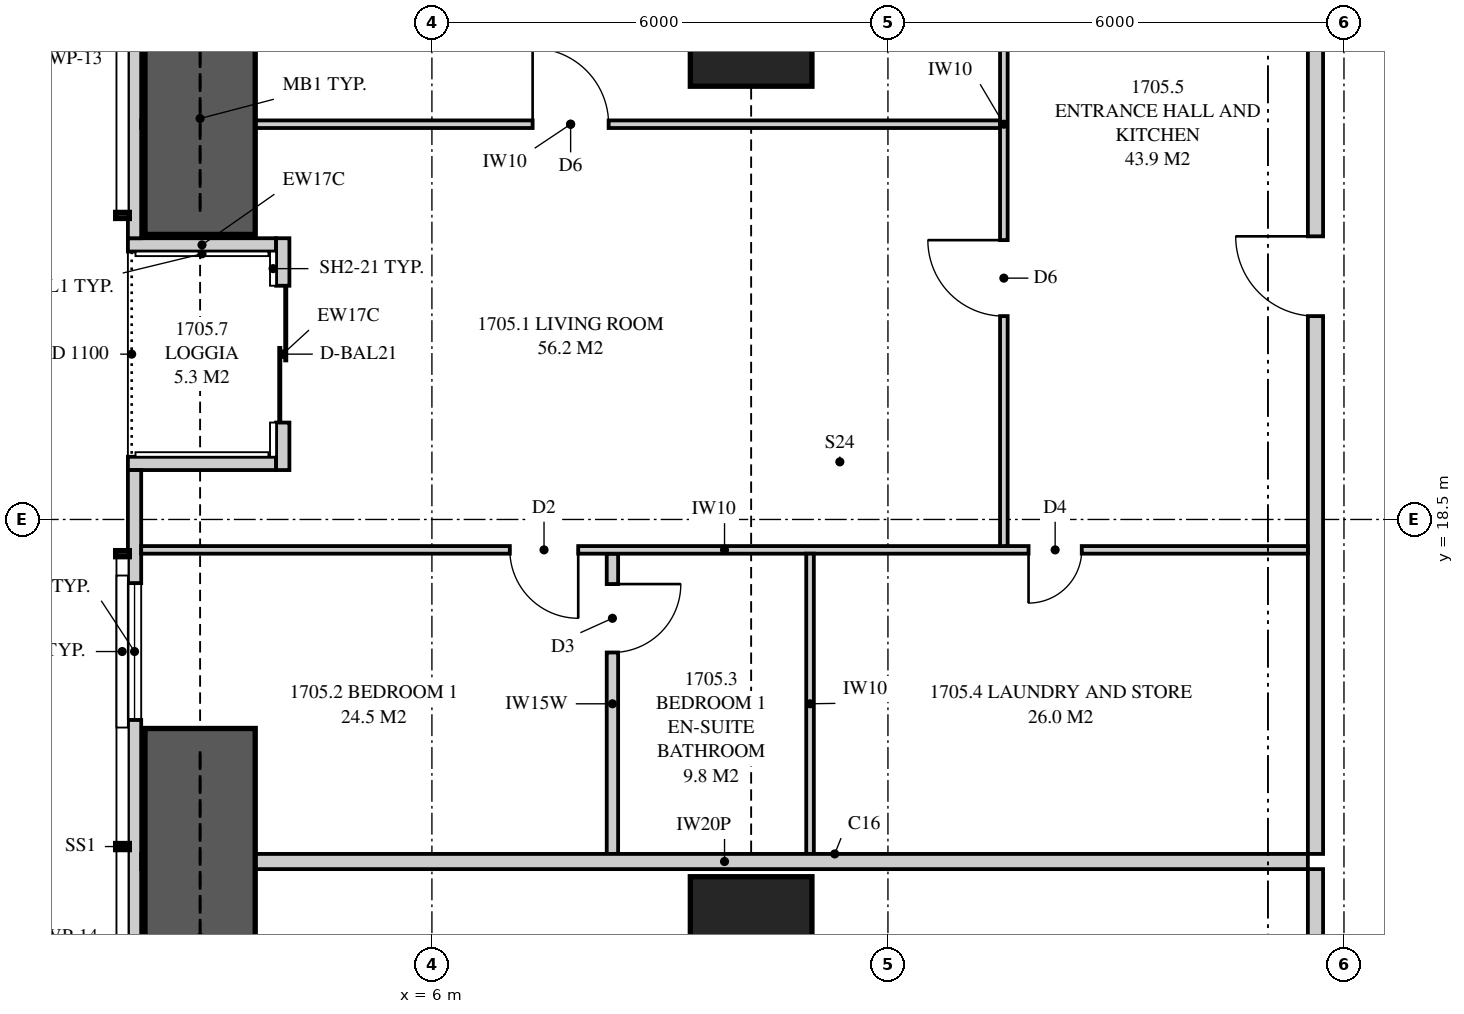
"""IFC4 building model, lengths in metres.
Left out: names, types, materials, properties, quantities, classifications, styles, units other than length and angle.
Written with IfcOpenShell. Run it as: python <this file> out.ifc"""

import sys

from ifc_helpers import new_model, si_unit, direction, frame, frame_2d, origin, origin_2d, place, context, subcontext, project, spatial, polyline, rectangle, outline, extrude, element, fill, save


model = new_model("IFC4")
c1 = context("Model", 3, precision=1e-05, world=origin(), true_north=direction((0.0, 1.0)))
c2 = subcontext(c1, "Body", "Model", "MODEL_VIEW")
j1 = project(units=[si_unit("LENGTHUNIT", "METRE"), si_unit("PLANEANGLEUNIT", "RADIAN")], contexts=[c1])
p1 = place(None, origin())
s1 = spatial("IfcSite", under=j1, at=p1, CompositionType="ELEMENT")
p2 = place(p1, origin())
s2 = spatial("IfcBuilding", under=s1, at=p2, CompositionType="ELEMENT")
p3 = place(p2, frame((0.0, 0.0, 64.55)))
s3 = spatial("IfcBuildingStorey", under=s2, at=p3, CompositionType="ELEMENT", Elevation=64.55)
for number, where, z_axis, x_axis in (
    (1, (10.2, 13.0, 0.0), (0.0, 0.0, 1.0), (1.0, 0.0, 0.0)),
    (2, (10.2, 25.0, 0.0), (0.0, 0.0, 1.0), (1.0, 0.0, 0.0)),
):
    element("IfcColumn", number, at=place(p3, frame(where, z_axis=z_axis, x_axis=x_axis)), inside=s3, PredefinedType="COLUMN", context=c2, shape_type="SweptSolid", body=[
        extrude(rectangle(XDim=1.6, YDim=1.6, at=origin_2d()), origin(), (0.0, 0.0, 1.0), 3.35),
    ])
p4 = place(p3, frame((2.087, 34.949, 0.0), z_axis=(0.0, 0.0, 1.0), x_axis=(0.0, -1.0, 0.0)))
e3 = element("IfcWall", 3, at=p4, inside=s3, PredefinedType="SOLIDWALL", context=c2, shape_type="SweptSolid", body=[
    extrude(outline(polyline([(0.0, 0.0), (12.749, 0.0), (12.749, 2.15), (9.949, 2.15), (9.949, 3.11), (9.823, 3.11), (9.823, 2.15), (9.73, 2.15), (9.73, 3.11), (0.0, 3.11), (0.0, 0.0)])), frame((0.0, 0.087, 0.0), z_axis=(0.0, -1.0, 0.0), x_axis=(1.0, 0.0, 0.0)), (0.0, 0.0, 1.0), 0.175),
])
p5 = place(p4, frame((2.722, 0.0, 0.4)))
e4 = element("IfcOpeningElement", 4, at=p5, cuts=e3, PredefinedType="OPENING", context=c2, shape_type="SweptSolid", body=[
    extrude(rectangle(XDim=1.8, YDim=1.7, at=frame_2d((0.9, 0.85))), frame((0.0, 0.097, 0.0), z_axis=(0.0, -1.0, 0.0), x_axis=(1.0, 0.0, 0.0)), (0.0, 0.0, 1.0), 0.195),
])
p6 = place(p4, frame((5.899, 0.0, 0.4)))
e5 = element("IfcOpeningElement", 5, at=p6, cuts=e3, PredefinedType="OPENING", context=c2, shape_type="SweptSolid", body=[
    extrude(rectangle(XDim=1.2, YDim=1.7, at=frame_2d((0.6, 0.85))), frame((0.0, 0.097, 0.0), z_axis=(0.0, -1.0, 0.0), x_axis=(1.0, 0.0, 0.0)), (0.0, 0.0, 1.0), 0.195),
])
p7 = place(p3, frame((2.087, 19.15, 0.0), z_axis=(0.0, 0.0, 1.0), x_axis=(0.0, -1.0, 0.0)))
e6 = element("IfcWall", 6, at=p7, inside=s3, PredefinedType="SOLIDWALL", context=c2, shape_type="SweptSolid", body=[
    extrude(outline(polyline([(0.0, 0.0), (16.099, 0.0), (16.099, 3.11), (6.369, 3.11), (6.369, 2.15), (6.276, 2.15), (6.276, 3.11), (6.15, 3.11), (6.15, 2.15), (0.0, 2.15), (0.0, 0.0)])), frame((0.0, 0.087, 0.0), z_axis=(0.0, -1.0, 0.0), x_axis=(1.0, 0.0, 0.0)), (0.0, 0.0, 1.0), 0.175),
])
p8 = place(p7, frame((1.488, 0.0, 0.4)))
e7 = element("IfcOpeningElement", 7, at=p8, cuts=e6, PredefinedType="OPENING", context=c2, shape_type="SweptSolid", body=[
    extrude(rectangle(XDim=1.8, YDim=1.7, at=frame_2d((0.9, 0.85))), frame((0.0, 0.097, 0.0), z_axis=(0.0, -1.0, 0.0), x_axis=(1.0, 0.0, 0.0)), (0.0, 0.0, 1.0), 0.195),
])
p9 = place(p7, frame((9.106, 0.0, 0.4)))
e8 = element("IfcOpeningElement", 8, at=p9, cuts=e6, PredefinedType="OPENING", context=c2, shape_type="SweptSolid", body=[
    extrude(rectangle(XDim=1.2, YDim=1.7, at=frame_2d((0.6, 0.85))), frame((0.0, 0.097, 0.0), z_axis=(0.0, -1.0, 0.0), x_axis=(1.0, 0.0, 0.0)), (0.0, 0.0, 1.0), 0.195),
])
p10 = place(p7, frame((12.077, 0.0, 0.4)))
e9 = element("IfcOpeningElement", 9, at=p10, cuts=e6, PredefinedType="OPENING", context=c2, shape_type="SweptSolid", body=[
    extrude(rectangle(XDim=1.8, YDim=1.7, at=frame_2d((0.9, 0.85))), frame((0.0, 0.097, 0.0), z_axis=(0.0, -1.0, 0.0), x_axis=(1.0, 0.0, 0.0)), (0.0, 0.0, 1.0), 0.195),
])
p11 = place(p3, frame((4.038, 22.2, 0.0), z_axis=(0.0, 0.0, 1.0), x_axis=(0.0, -1.0, 0.0)))
e10 = element("IfcWall", 10, at=p11, inside=s3, PredefinedType="SOLIDWALL", context=c2, shape_type="SweptSolid", body=[
    extrude(rectangle(XDim=3.05, YDim=0.175, at=frame_2d((1.525, 0.0))), origin(), (0.0, 0.0, 1.0), 3.11),
])
p12 = place(p11, frame((0.625, 0.0, 0.0)))
e11 = element("IfcOpeningElement", 11, at=p12, cuts=e10, PredefinedType="OPENING", context=c2, shape_type="SweptSolid", body=[
    extrude(rectangle(XDim=1.8, YDim=2.1, at=frame_2d((0.9, 1.05))), frame((0.0, 0.097, 0.0), z_axis=(0.0, -1.0, 0.0), x_axis=(1.0, 0.0, 0.0)), (0.0, 0.0, 1.0), 0.195),
])
for number, where, z_axis, x_axis in (
    (12, (2.0, 22.113, 0.0), (0.0, 0.0, 1.0), (1.0, 0.0, 0.0)),
    (13, (2.0, 19.238, 0.0), (0.0, 0.0, 1.0), (1.0, 0.0, 0.0)),
):
    element("IfcWall", number, at=place(p3, frame(where, z_axis=z_axis, x_axis=x_axis)), inside=s3, PredefinedType="SOLIDWALL", context=c2, shape_type="SweptSolid", body=[
        extrude(outline(polyline([(0.0, 0.0), (1.95, 0.0), (1.95, 3.11), (1.75, 3.11), (1.75, 2.15), (0.15, 2.15), (0.15, 3.11), (0.0, 3.11), (0.0, 0.0)])), frame((0.0, 0.087, 0.0), z_axis=(0.0, -1.0, 0.0), x_axis=(1.0, 0.0, 0.0)), (0.0, 0.0, 1.0), 0.175),
    ])
p13 = place(p3, frame((2.175, 14.0, 0.0), z_axis=(0.0, 0.0, 1.0), x_axis=(1.0, 0.0, 0.0)))
e14 = element("IfcWall", 14, at=p13, inside=s3, PredefinedType="PARTITIONING", context=c2, shape_type="SweptSolid", body=[
    extrude(outline(polyline([(0.529, 2.15), (0.0, 2.15), (0.0, 0.0), (0.529, 0.0), (0.529, 0.82), (1.021, 0.82), (1.021, 0.0), (15.35, 0.0), (15.35, 3.11), (9.335, 3.11), (9.335, 2.51), (6.715, 2.51), (6.715, 3.11), (1.685, 3.11), (1.685, 2.15), (1.021, 2.15), (1.021, 1.33), (0.529, 1.33), (0.529, 2.15)])), frame((0.0, 0.1, 0.0), z_axis=(0.0, -1.0, 0.0), x_axis=(1.0, 0.0, 0.0)), (0.0, 0.0, 1.0), 0.2),
])
p14 = place(p3, frame((17.625, 7.75, 0.0), z_axis=(0.0, 0.0, 1.0), x_axis=(0.0, 1.0, 0.0)))
e15 = element("IfcWall", 15, at=p14, inside=s3, PredefinedType="PARTITIONING", context=c2, shape_type="SweptSolid", body=[
    extrude(outline(polyline([(0.0, 0.0), (6.15, 0.0), (6.15, 3.11), (5.587, 3.11), (5.587, 2.541), (4.913, 2.541), (4.913, 3.11), (0.0, 3.11), (0.0, 0.0)])), frame((0.0, 0.1, 0.0), z_axis=(0.0, -1.0, 0.0), x_axis=(1.0, 0.0, 0.0)), (0.0, 0.0, 1.0), 0.2),
])
p15 = place(p14, frame((2.175, 0.0, 0.0)))
e16 = element("IfcOpeningElement", 16, at=p15, cuts=e15, PredefinedType="OPENING", context=c2, shape_type="SweptSolid", body=[
    extrude(rectangle(XDim=1.8, YDim=2.1, at=frame_2d((0.9, 1.05))), frame((0.0, 0.11, 0.0), z_axis=(0.0, -1.0, 0.0), x_axis=(1.0, 0.0, 0.0)), (0.0, 0.0, 1.0), 0.22),
])
p16 = place(p3, frame((17.625, 14.1, 0.0), z_axis=(0.0, 0.0, 1.0), x_axis=(0.0, 1.0, 0.0)))
e17 = element("IfcWall", 17, at=p16, inside=s3, PredefinedType="PARTITIONING", context=c2, shape_type="SweptSolid", body=[
    extrude(outline(polyline([(0.0, 0.0), (15.15, 0.0), (15.15, 3.11), (11.237, 3.11), (11.237, 2.541), (10.562, 2.541), (10.562, 3.11), (0.0, 3.11), (0.0, 0.0)])), frame((0.0, 0.1, 0.0), z_axis=(0.0, -1.0, 0.0), x_axis=(1.0, 0.0, 0.0)), (0.0, 0.0, 1.0), 0.2),
])
p17 = place(p16, frame((7.075, 0.0, 0.0)))
e18 = element("IfcOpeningElement", 18, at=p17, cuts=e17, PredefinedType="OPENING", context=c2, shape_type="SweptSolid", body=[
    extrude(rectangle(XDim=1.05, YDim=2.2, at=frame_2d((0.525, 1.1))), frame((0.0, 0.11, 0.0), z_axis=(0.0, -1.0, 0.0), x_axis=(1.0, 0.0, 0.0)), (0.0, 0.0, 1.0), 0.22),
])
p18 = place(p3, frame((2.175, 18.1, 0.0), z_axis=(0.0, 0.0, 1.0), x_axis=(1.0, 0.0, 0.0)))
e19 = element("IfcWall", 19, at=p18, inside=s3, PredefinedType="PARTITIONING", context=c2, shape_type="SweptSolid", body=[
    extrude(outline(polyline([(0.0, 0.0), (15.35, 0.0), (15.35, 3.11), (9.285, 3.11), (9.285, 2.51), (6.765, 2.51), (6.765, 3.11), (1.635, 3.11), (1.635, 2.15), (0.0, 2.15), (0.0, 3.11), (0.0, 0.0)])), frame((0.0, 0.05, 0.0), z_axis=(0.0, -1.0, 0.0), x_axis=(1.0, 0.0, 0.0)), (0.0, 0.0, 1.0), 0.1),
])
p19 = place(p18, frame((4.85, 0.0, 0.0)))
e20 = element("IfcOpeningElement", 20, at=p19, cuts=e19, PredefinedType="OPENING", context=c2, shape_type="SweptSolid", body=[
    extrude(rectangle(XDim=0.9, YDim=2.1, at=frame_2d((0.45, 1.05))), frame((0.0, 0.06, 0.0), z_axis=(0.0, -1.0, 0.0), x_axis=(1.0, 0.0, 0.0)), (0.0, 0.0, 1.0), 0.12),
])
p20 = place(p18, frame((11.675, 0.0, 0.0)))
e21 = element("IfcOpeningElement", 21, at=p20, cuts=e19, PredefinedType="OPENING", context=c2, shape_type="SweptSolid", body=[
    extrude(rectangle(XDim=0.7, YDim=2.1, at=frame_2d((0.35, 1.05))), frame((0.0, 0.06, 0.0), z_axis=(0.0, -1.0, 0.0), x_axis=(1.0, 0.0, 0.0)), (0.0, 0.0, 1.0), 0.12),
])
p21 = place(p3, frame((8.375, 14.1, 0.0), z_axis=(0.0, 0.0, 1.0), x_axis=(0.0, 1.0, 0.0)))
e22 = element("IfcWall", 22, at=p21, inside=s3, PredefinedType="PLUMBINGWALL", context=c2, shape_type="SweptSolid", body=[
    extrude(rectangle(XDim=3.95, YDim=0.15, at=frame_2d((1.975, 0.0))), origin(), (0.0, 0.0, 1.0), 3.11),
])
p22 = place(p21, frame((2.65, 0.0, 0.0)))
e23 = element("IfcOpeningElement", 23, at=p22, cuts=e22, PredefinedType="OPENING", context=c2, shape_type="SweptSolid", body=[
    extrude(rectangle(XDim=0.9, YDim=2.1, at=frame_2d((0.45, 1.05))), frame((0.0, 0.085, 0.0), z_axis=(0.0, -1.0, 0.0), x_axis=(1.0, 0.0, 0.0)), (0.0, 0.0, 1.0), 0.17),
])
p23 = place(p3, frame((10.975, 14.1, 0.0), z_axis=(0.0, 0.0, 1.0), x_axis=(0.0, 1.0, 0.0)))
e24 = element("IfcWall", 24, at=p23, inside=s3, PredefinedType="PARTITIONING", context=c2, shape_type="SweptSolid", body=[
    extrude(outline(polyline([(0.0, 0.0), (3.95, 0.0), (3.95, 3.11), (3.95, 2.51), (0.0, 2.51), (0.0, 3.11), (0.0, 0.0)])), frame((0.0, 0.05, 0.0), z_axis=(0.0, -1.0, 0.0), x_axis=(1.0, 0.0, 0.0)), (0.0, 0.0, 1.0), 0.1),
])
p24 = place(p3, frame((13.525, 18.15, 0.0), z_axis=(0.0, 0.0, 1.0), x_axis=(0.0, 1.0, 0.0)))
e25 = element("IfcWall", 25, at=p24, inside=s3, PredefinedType="PARTITIONING", context=c2, shape_type="SweptSolid", body=[
    extrude(outline(polyline([(0.0, 0.0), (11.1, 0.0), (11.1, 3.11), (7.137, 3.11), (7.137, 2.541), (6.563, 2.541), (6.563, 3.11), (0.0, 3.11), (0.0, 0.0)])), frame((0.0, 0.05, 0.0), z_axis=(0.0, -1.0, 0.0), x_axis=(1.0, 0.0, 0.0)), (0.0, 0.0, 1.0), 0.1),
])
p25 = place(p24, frame((3.025, 0.0, 0.0)))
e26 = element("IfcOpeningElement", 26, at=p25, cuts=e25, PredefinedType="OPENING", context=c2, shape_type="SweptSolid", body=[
    extrude(rectangle(XDim=1.0, YDim=2.1, at=frame_2d((0.5, 1.05))), frame((0.0, 0.06, 0.0), z_axis=(0.0, -1.0, 0.0), x_axis=(1.0, 0.0, 0.0)), (0.0, 0.0, 1.0), 0.12),
])
p26 = place(p3, frame((2.175, 23.7, 0.0), z_axis=(0.0, 0.0, 1.0), x_axis=(1.0, 0.0, 0.0)))
e27 = element("IfcWall", 27, at=p26, inside=s3, PredefinedType="PARTITIONING", context=c2, shape_type="SweptSolid", body=[
    extrude(outline(polyline([(0.529, 2.15), (0.0, 2.15), (0.0, 0.0), (0.529, 0.0), (0.529, 0.581), (1.021, 0.581), (1.021, 0.0), (11.3, 0.0), (11.3, 3.11), (9.285, 3.11), (9.285, 2.51), (6.765, 2.51), (6.765, 3.11), (1.635, 3.11), (1.635, 2.15), (1.021, 2.15), (1.021, 1.569), (0.529, 1.569), (0.529, 2.15)])), frame((0.0, 0.05, 0.0), z_axis=(0.0, -1.0, 0.0), x_axis=(1.0, 0.0, 0.0)), (0.0, 0.0, 1.0), 0.1),
])
p27 = place(p26, frame((5.15, 0.0, 0.0)))
e28 = element("IfcOpeningElement", 28, at=p27, cuts=e27, PredefinedType="OPENING", context=c2, shape_type="SweptSolid", body=[
    extrude(rectangle(XDim=1.0, YDim=2.1, at=frame_2d((0.5, 1.05))), frame((0.0, 0.06, 0.0), z_axis=(0.0, -1.0, 0.0), x_axis=(1.0, 0.0, 0.0)), (0.0, 0.0, 1.0), 0.12),
])
for number, where, z_axis, x_axis in (
    (29, (2.95, 22.25, 0.0), (0.0, 0.0, 1.0), (0.0, 1.0, 0.0)),
    (30, (2.95, 10.25, 0.0), (0.0, 0.0, 1.0), (0.0, 1.0, 0.0)),
):
    element("IfcWall", number, at=place(p3, frame(where, z_axis=z_axis, x_axis=x_axis)), inside=s3, PredefinedType="SHEAR", context=c2, shape_type="SweptSolid", body=[
        extrude(rectangle(XDim=5.5, YDim=1.45, at=frame_2d((2.75, 0.0))), origin(), (0.0, 0.0, 1.0), 3.35),
    ])
p28 = place(p12, origin())
e31 = element("IfcDoor", 31, at=p28, inside=s3, OperationType="SLIDING_TO_LEFT", PredefinedType="DOOR", context=c2, shape_type="SweptSolid", body=[
    extrude(rectangle(XDim=1.8, YDim=2.1, at=frame_2d((0.9, 1.05))), frame((0.0, 0.025, 0.0), z_axis=(0.0, -1.0, 0.0), x_axis=(1.0, 0.0, 0.0)), (0.0, 0.0, 1.0), 0.05),
])
fill(e11, e31)
p29 = place(p8, origin())
e32 = element("IfcWindow", 32, at=p29, inside=s3, PartitioningType="SINGLE_PANEL", PredefinedType="WINDOW", context=c2, shape_type="SweptSolid", body=[
    extrude(rectangle(XDim=1.8, YDim=1.7, at=frame_2d((0.9, 0.85))), frame((0.0, 0.03, 0.0), z_axis=(0.0, -1.0, 0.0), x_axis=(1.0, 0.0, 0.0)), (0.0, 0.0, 1.0), 0.06),
])
fill(e7, e32)
p30 = place(p17, origin())
e33 = element("IfcDoor", 33, at=p30, inside=s3, OperationType="SINGLE_SWING_RIGHT", PredefinedType="DOOR", context=c2, shape_type="SweptSolid", body=[
    extrude(rectangle(XDim=1.05, YDim=2.2, at=frame_2d((0.525, 1.1))), frame((0.0, 0.025, 0.0), z_axis=(0.0, -1.0, 0.0), x_axis=(1.0, 0.0, 0.0)), (0.0, 0.0, 1.0), 0.05),
])
fill(e18, e33)
p31 = place(p19, frame((0.9, 0.0, 0.0), z_axis=(0.0, 0.0, 1.0), x_axis=(-1.0, 0.0, 0.0)))
e34 = element("IfcDoor", 34, at=p31, inside=s3, OperationType="SINGLE_SWING_LEFT", PredefinedType="DOOR", context=c2, shape_type="SweptSolid", body=[
    extrude(rectangle(XDim=0.9, YDim=2.1, at=frame_2d((0.45, 1.05))), frame((0.0, 0.025, 0.0), z_axis=(0.0, -1.0, 0.0), x_axis=(1.0, 0.0, 0.0)), (0.0, 0.0, 1.0), 0.05),
])
fill(e20, e34)
p32 = place(p22, frame((0.9, 0.0, 0.0), z_axis=(0.0, 0.0, 1.0), x_axis=(-1.0, 0.0, 0.0)))
e35 = element("IfcDoor", 35, at=p32, inside=s3, OperationType="SINGLE_SWING_LEFT", PredefinedType="DOOR", context=c2, shape_type="SweptSolid", body=[
    extrude(rectangle(XDim=0.9, YDim=2.1, at=frame_2d((0.45, 1.05))), frame((0.0, 0.025, 0.0), z_axis=(0.0, -1.0, 0.0), x_axis=(1.0, 0.0, 0.0)), (0.0, 0.0, 1.0), 0.05),
])
fill(e23, e35)
p33 = place(p20, frame((0.7, 0.0, 0.0), z_axis=(0.0, 0.0, 1.0), x_axis=(-1.0, 0.0, 0.0)))
e36 = element("IfcDoor", 36, at=p33, inside=s3, OperationType="SINGLE_SWING_RIGHT", PredefinedType="DOOR", context=c2, shape_type="SweptSolid", body=[
    extrude(rectangle(XDim=0.7, YDim=2.1, at=frame_2d((0.35, 1.05))), frame((0.0, 0.025, 0.0), z_axis=(0.0, -1.0, 0.0), x_axis=(1.0, 0.0, 0.0)), (0.0, 0.0, 1.0), 0.05),
])
fill(e21, e36)
p34 = place(p25, origin())
e37 = element("IfcDoor", 37, at=p34, inside=s3, OperationType="SINGLE_SWING_RIGHT", PredefinedType="DOOR", context=c2, shape_type="SweptSolid", body=[
    extrude(rectangle(XDim=1.0, YDim=2.1, at=frame_2d((0.5, 1.05))), frame((0.0, 0.025, 0.0), z_axis=(0.0, -1.0, 0.0), x_axis=(1.0, 0.0, 0.0)), (0.0, 0.0, 1.0), 0.05),
])
fill(e26, e37)
p35 = place(p27, origin())
e38 = element("IfcDoor", 38, at=p35, inside=s3, OperationType="SINGLE_SWING_LEFT", PredefinedType="DOOR", context=c2, shape_type="SweptSolid", body=[
    extrude(rectangle(XDim=1.0, YDim=2.1, at=frame_2d((0.5, 1.05))), frame((0.0, 0.025, 0.0), z_axis=(0.0, -1.0, 0.0), x_axis=(1.0, 0.0, 0.0)), (0.0, 0.0, 1.0), 0.05),
])
fill(e28, e38)
save(model, sys.argv[1])
